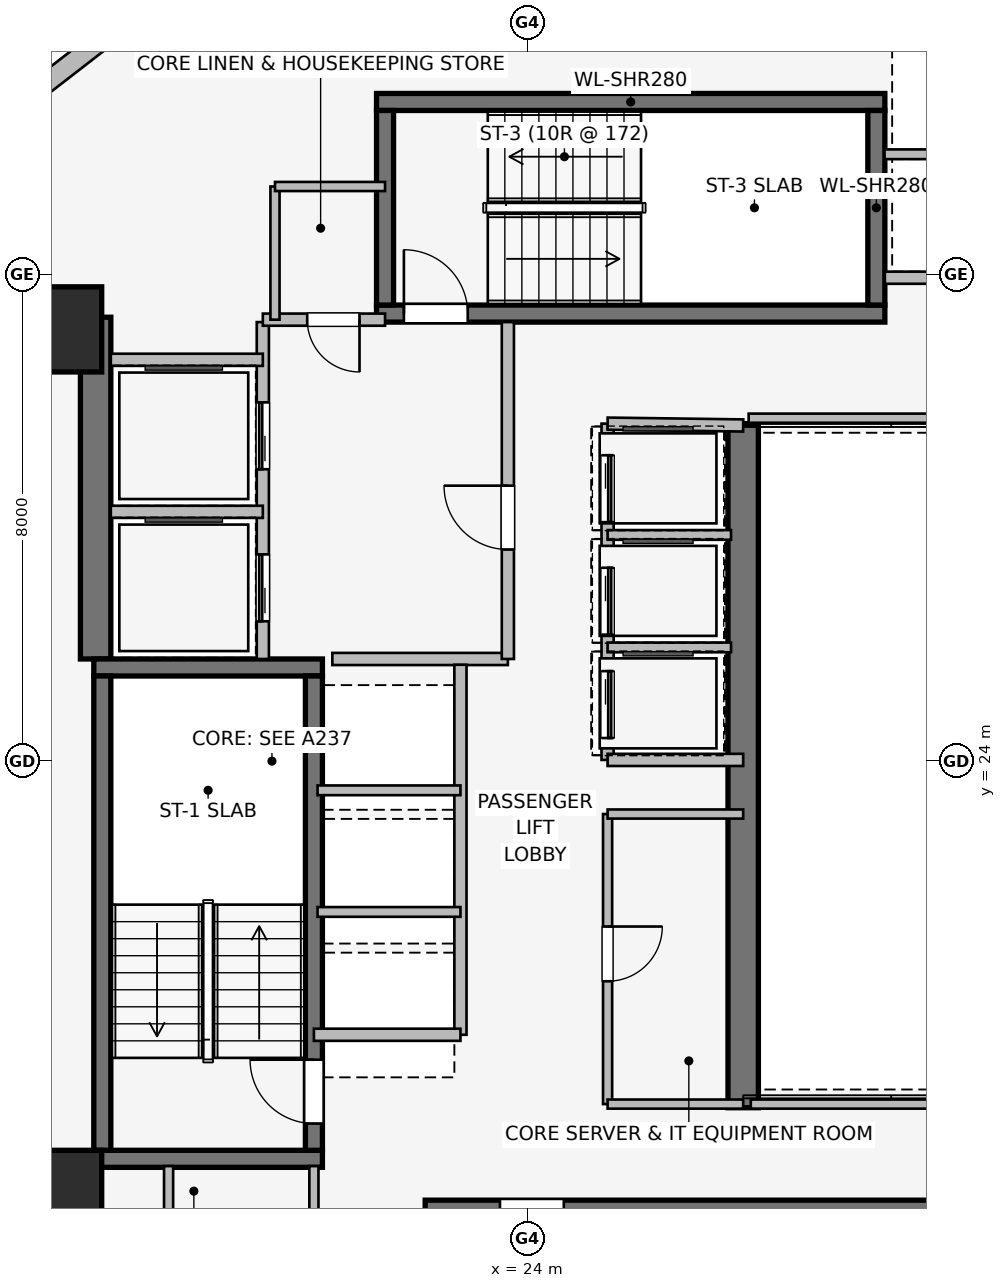
"""IFC4 building model, lengths in metres.
Left out: names, types, materials, properties, quantities, classifications, styles, units other than length and angle.
Written with IfcOpenShell. Run it as: python <this file> out.ifc"""

import sys

from ifc_helpers import new_model, si_unit, direction, frame, frame_2d, origin, origin_2d, place, context, subcontext, project, spatial, rectangle, extrude, element, fill, save


model = new_model("IFC4")
c1 = context("Model", 3, precision=1e-05, world=origin(), true_north=direction((0.0, 1.0)))
c2 = subcontext(c1, "Body", "Model", "MODEL_VIEW")
j1 = project(units=[si_unit("LENGTHUNIT", "METRE"), si_unit("PLANEANGLEUNIT", "RADIAN")], contexts=[c1])
p1 = place(None, origin())
s1 = spatial("IfcSite", under=j1, at=p1, CompositionType="ELEMENT")
p2 = place(p1, origin())
s2 = spatial("IfcBuilding", under=s1, at=p2, CompositionType="ELEMENT")
p3 = place(p2, frame((0.0, 0.0, 132.6)))
s3 = spatial("IfcBuildingStorey", under=s2, at=p3, CompositionType="ELEMENT", Elevation=132.6)
p4 = place(p3, frame((16.9, 25.68, 0.0), z_axis=(0.0, 0.0, 1.0), x_axis=(0.0, 1.0, 0.0)))
e1 = element("IfcWall", 1, at=p4, inside=s3, PredefinedType="SHEAR", context=c2, shape_type="SweptSolid", body=[
    extrude(rectangle(XDim=5.62, YDim=0.5, at=frame_2d((2.81, 0.0))), origin(), (0.0, 0.0, 1.0), 3.45),
])
p5 = place(p3, frame((27.55, 29.55, 0.0), z_axis=(0.0, 0.0, 1.0), x_axis=(0.0, -1.0, 0.0)))
e2 = element("IfcWall", 2, at=p5, inside=s3, PredefinedType="SHEAR", context=c2, shape_type="SweptSolid", body=[
    extrude(rectangle(XDim=11.25, YDim=0.5, at=frame_2d((5.625, 0.0))), origin(), (0.0, 0.0, 1.0), 3.45),
])
for number, where, z_axis, x_axis in (
    (3, (16.87, 17.46, 0.0), (0.0, 0.0, 1.0), (1.0, 0.0, 0.0)),
    (4, (20.63, 25.54, 0.0), (0.0, 0.0, 1.0), (-1.0, 0.0, 0.0)),
):
    element("IfcWall", number, at=place(p3, frame(where, z_axis=z_axis, x_axis=x_axis)), inside=s3, PredefinedType="SHEAR", context=c2, shape_type="SweptSolid", body=[
        extrude(rectangle(XDim=3.76, YDim=0.28, at=frame_2d((1.88, 0.0))), origin(), (0.0, 0.0, 1.0), 3.45),
    ])
p6 = place(p3, frame((17.01, 25.4, 0.0), z_axis=(0.0, 0.0, 1.0), x_axis=(0.0, -1.0, 0.0)))
e5 = element("IfcWall", 5, at=p6, inside=s3, PredefinedType="SHEAR", context=c2, shape_type="SweptSolid", body=[
    extrude(rectangle(XDim=7.8, YDim=0.28, at=frame_2d((3.9, 0.0))), origin(), (0.0, 0.0, 1.0), 3.45),
])
p7 = place(p3, frame((20.49, 17.6, 0.0), z_axis=(0.0, 0.0, 1.0), x_axis=(0.0, 1.0, 0.0)))
e6 = element("IfcWall", 6, at=p7, inside=s3, PredefinedType="SHEAR", context=c2, shape_type="SweptSolid", body=[
    extrude(rectangle(XDim=7.8, YDim=0.28, at=frame_2d((3.9, 0.0))), origin(), (0.0, 0.0, 1.0), 3.45),
])
p8 = place(p7, frame((0.44, 0.0, 0.0)))
e7 = element("IfcOpeningElement", 7, at=p8, cuts=e6, PredefinedType="OPENING", context=c2, shape_type="SweptSolid", body=[
    extrude(rectangle(XDim=1.05, YDim=2.0, at=frame_2d((0.525, 1.0))), frame((0.0, 0.15, 0.0), z_axis=(0.0, -1.0, 0.0), x_axis=(1.0, 0.0, 0.0)), (0.0, 0.0, 1.0), 0.3),
])
p9 = place(p3, frame((30.68, 16.64, 0.0), z_axis=(0.0, 0.0, 1.0), x_axis=(-1.0, 0.0, 0.0)))
e8 = element("IfcWall", 8, at=p9, inside=s3, PredefinedType="SHEAR", context=c2, shape_type="SweptSolid", body=[
    extrude(rectangle(XDim=8.36, YDim=0.28, at=frame_2d((4.18, 0.0))), origin(), (0.0, 0.0, 1.0), 3.45),
])
p10 = place(p9, frame((6.08, 0.0, 0.0)))
e9 = element("IfcOpeningElement", 9, at=p10, cuts=e8, PredefinedType="OPENING", context=c2, shape_type="SweptSolid", body=[
    extrude(rectangle(XDim=1.05, YDim=2.0, at=frame_2d((0.525, 1.0))), frame((0.0, 0.15, 0.0), z_axis=(0.0, -1.0, 0.0), x_axis=(1.0, 0.0, 0.0)), (0.0, 0.0, 1.0), 0.3),
])
p11 = place(p3, frame((21.52, 31.36, 0.0), z_axis=(0.0, 0.0, 1.0), x_axis=(1.0, 0.0, 0.0)))
e10 = element("IfcWall", 10, at=p11, inside=s3, PredefinedType="SHEAR", context=c2, shape_type="SweptSolid", body=[
    extrude(rectangle(XDim=8.36, YDim=0.28, at=frame_2d((4.18, 0.0))), origin(), (0.0, 0.0, 1.0), 3.45),
])
p12 = place(p11, frame((0.45, 0.0, 0.0)))
e11 = element("IfcOpeningElement", 11, at=p12, cuts=e10, PredefinedType="OPENING", context=c2, shape_type="SweptSolid", body=[
    extrude(rectangle(XDim=1.05, YDim=2.0, at=frame_2d((0.525, 1.0))), frame((0.0, 0.15, 0.0), z_axis=(0.0, -1.0, 0.0), x_axis=(1.0, 0.0, 0.0)), (0.0, 0.0, 1.0), 0.3),
])
p13 = place(p3, frame((29.88, 34.84, 0.0), z_axis=(0.0, 0.0, 1.0), x_axis=(-1.0, 0.0, 0.0)))
e12 = element("IfcWall", 12, at=p13, inside=s3, PredefinedType="SHEAR", context=c2, shape_type="SweptSolid", body=[
    extrude(rectangle(XDim=8.36, YDim=0.28, at=frame_2d((4.18, 0.0))), origin(), (0.0, 0.0, 1.0), 3.45),
])
for number, where, z_axis, x_axis in (
    (13, (21.66, 34.7, 0.0), (0.0, 0.0, 1.0), (0.0, -1.0, 0.0)),
    (14, (29.74, 31.5, 0.0), (0.0, 0.0, 1.0), (0.0, 1.0, 0.0)),
):
    element("IfcWall", number, at=place(p3, frame(where, z_axis=z_axis, x_axis=x_axis)), inside=s3, PredefinedType="SHEAR", context=c2, shape_type="SweptSolid", body=[
        extrude(rectangle(XDim=3.2, YDim=0.28, at=frame_2d((1.6, 0.0))), origin(), (0.0, 0.0, 1.0), 3.45),
    ])
for number, where, z_axis, x_axis in (
    (15, (16.3, 16.9, 0.0), (0.0, 0.0, 1.0), (1.0, 0.0, 0.0)),
    (16, (16.3, 31.1, 0.0), (0.0, 0.0, 1.0), (1.0, 0.0, 0.0)),
):
    element("IfcColumn", number, at=place(p3, frame(where, z_axis=z_axis, x_axis=x_axis)), inside=s3, PredefinedType="COLUMN", context=c2, shape_type="SweptSolid", body=[
        extrude(rectangle(XDim=1.4, YDim=1.4, at=origin_2d()), origin(), (0.0, 0.0, 1.0), 3.45),
    ])
p14 = place(p3, frame((15.918, 35.024, 0.0), z_axis=(0.0, 0.0, 1.0), x_axis=(0.790621329885, 0.612305408053, 0.0)))
e17 = element("IfcWall", 17, at=p14, inside=s3, PredefinedType="STANDARD", context=c2, shape_type="SweptSolid", body=[
    extrude(rectangle(XDim=1.676, YDim=0.33, at=frame_2d((0.838, 0.0))), origin(), (0.0, 0.0, 1.0), 3.19),
])
p15 = place(p3, frame((19.65, 25.68, 0.0), z_axis=(0.0, 0.0, 1.0), x_axis=(0.0, 1.0, 0.0)))
e18 = element("IfcWall", 18, at=p15, inside=s3, PredefinedType="PARTITIONING", context=c2, shape_type="SweptSolid", body=[
    extrude(rectangle(XDim=5.54, YDim=0.2, at=frame_2d((2.77, 0.0))), origin(), (0.0, 0.0, 1.0), 3.19),
])
p16 = place(p15, frame((0.62, 0.0, 0.0)))
e19 = element("IfcOpeningElement", 19, at=p16, cuts=e18, PredefinedType="OPENING", context=c2, shape_type="SweptSolid", body=[
    extrude(rectangle(XDim=1.1, YDim=2.2, at=frame_2d((0.55, 1.1))), frame((0.0, 0.11, 0.0), z_axis=(0.0, -1.0, 0.0), x_axis=(1.0, 0.0, 0.0)), (0.0, 0.0, 1.0), 0.22),
])
p17 = place(p15, frame((3.12, 0.0, 0.0)))
e20 = element("IfcOpeningElement", 20, at=p17, cuts=e18, PredefinedType="OPENING", context=c2, shape_type="SweptSolid", body=[
    extrude(rectangle(XDim=1.1, YDim=2.2, at=frame_2d((0.55, 1.1))), frame((0.0, 0.11, 0.0), z_axis=(0.0, -1.0, 0.0), x_axis=(1.0, 0.0, 0.0)), (0.0, 0.0, 1.0), 0.22),
])
p18 = place(p3, frame((20.793, 25.68, 0.0), z_axis=(0.0, 0.0, 1.0), x_axis=(1.0, 0.0, 0.0)))
e21 = element("IfcWall", 21, at=p18, inside=s3, PredefinedType="PARTITIONING", context=c2, shape_type="SweptSolid", body=[
    extrude(rectangle(XDim=2.887, YDim=0.2, at=frame_2d((1.443, 0.0))), origin(), (0.0, 0.0, 1.0), 3.19),
])
p19 = place(p3, frame((23.68, 25.68, 0.0), z_axis=(0.0, 0.0, 1.0), x_axis=(0.0, 1.0, 0.0)))
e22 = element("IfcWall", 22, at=p19, inside=s3, PredefinedType="PARTITIONING", context=c2, shape_type="SweptSolid", body=[
    extrude(rectangle(XDim=5.54, YDim=0.2, at=frame_2d((2.77, 0.0))), origin(), (0.0, 0.0, 1.0), 3.19),
])
p20 = place(p19, frame((1.8, 0.0, 0.0)))
e23 = element("IfcOpeningElement", 23, at=p20, cuts=e22, PredefinedType="OPENING", context=c2, shape_type="SweptSolid", body=[
    extrude(rectangle(XDim=1.05, YDim=2.0, at=frame_2d((0.525, 1.0))), frame((0.0, 0.11, 0.0), z_axis=(0.0, -1.0, 0.0), x_axis=(1.0, 0.0, 0.0)), (0.0, 0.0, 1.0), 0.22),
])
p21 = place(p3, frame((21.66, 31.26, 0.0), z_axis=(0.0, 0.0, 1.0), x_axis=(-1.0, 0.0, 0.0)))
e24 = element("IfcWall", 24, at=p21, inside=s3, PredefinedType="PARTITIONING", context=c2, shape_type="SweptSolid", body=[
    extrude(rectangle(XDim=2.01, YDim=0.2, at=frame_2d((1.005, 0.0))), origin(), (0.0, 0.0, 1.0), 3.19),
])
p22 = place(p21, frame((0.42, 0.0, 0.0)))
e25 = element("IfcOpeningElement", 25, at=p22, cuts=e24, PredefinedType="OPENING", context=c2, shape_type="SweptSolid", body=[
    extrude(rectangle(XDim=0.86, YDim=2.0, at=frame_2d((0.43, 1.0))), frame((0.0, 0.11, 0.0), z_axis=(0.0, -1.0, 0.0), x_axis=(1.0, 0.0, 0.0)), (0.0, 0.0, 1.0), 0.22),
])
p23 = place(p3, frame((17.15, 28.1, 0.0), z_axis=(0.0, 0.0, 1.0), x_axis=(1.0, 0.0, 0.0)))
e26 = element("IfcWall", 26, at=p23, inside=s3, PredefinedType="PARTITIONING", context=c2, shape_type="SweptSolid", body=[
    extrude(rectangle(XDim=2.5, YDim=0.2, at=frame_2d((1.25, 0.0))), origin(), (0.0, 0.0, 1.0), 3.19),
])
p24 = place(p3, frame((19.65, 30.6, 0.0), z_axis=(0.0, 0.0, 1.0), x_axis=(-1.0, 0.0, 0.0)))
e27 = element("IfcWall", 27, at=p24, inside=s3, PredefinedType="PARTITIONING", context=c2, shape_type="SweptSolid", body=[
    extrude(rectangle(XDim=2.5, YDim=0.2, at=frame_2d((1.25, 0.0))), origin(), (0.0, 0.0, 1.0), 2.09),
])
p25 = place(p3, frame((32.48, 31.95, 0.0), z_axis=(0.0, 0.0, 1.0), x_axis=(-1.0, 0.0, 0.0)))
e28 = element("IfcWall", 28, at=p25, inside=s3, PredefinedType="PARTITIONING", context=c2, shape_type="SweptSolid", body=[
    extrude(rectangle(XDim=2.6, YDim=0.2, at=frame_2d((1.3, 0.0))), origin(), (0.0, 0.0, 1.0), 3.19),
])
p26 = place(p3, frame((29.875, 33.98, 0.0), z_axis=(0.0, 0.0, 1.0), x_axis=(1.0, 0.0, 0.0)))
e29 = element("IfcWall", 29, at=p26, inside=s3, PredefinedType="PARTITIONING", context=c2, shape_type="SweptSolid", body=[
    extrude(rectangle(XDim=2.605, YDim=0.16, at=frame_2d((1.302, 0.0))), origin(), (0.0, 0.0, 1.0), 3.19),
])
p27 = place(p3, frame((22.9, 19.5, 0.0), z_axis=(0.0, 0.0, 1.0), x_axis=(0.0, 1.0, 0.0)))
e30 = element("IfcWall", 30, at=p27, inside=s3, PredefinedType="PARTITIONING", context=c2, shape_type="SweptSolid", body=[
    extrude(rectangle(XDim=6.085, YDim=0.2, at=frame_2d((3.042, 0.0))), origin(), (0.0, 0.0, 1.0), 3.19),
])
p28 = place(p3, frame((20.49, 19.5, 0.0), z_axis=(0.0, 0.0, 1.0), x_axis=(1.0, 0.0, 0.0)))
e31 = element("IfcWall", 31, at=p28, inside=s3, PredefinedType="PARTITIONING", context=c2, shape_type="SweptSolid", body=[
    extrude(rectangle(XDim=2.41, YDim=0.2, at=frame_2d((1.205, 0.0))), origin(), (0.0, 0.0, 1.0), 2.09),
])
for number, where, z_axis, x_axis in (
    (32, (20.55, 21.52, 0.0), (0.0, 0.0, 1.0), (1.0, 0.0, 0.0)),
    (33, (20.55, 23.52, 0.0), (0.0, 0.0, 1.0), (1.0, 0.0, 0.0)),
):
    element("IfcWall", number, at=place(p3, frame(where, z_axis=z_axis, x_axis=x_axis)), inside=s3, PredefinedType="PARTITIONING", context=c2, shape_type="SweptSolid", body=[
        extrude(rectangle(XDim=2.35, YDim=0.16, at=frame_2d((1.175, 0.0))), origin(), (0.0, 0.0, 1.0), 3.19),
    ])
p29 = place(p3, frame((25.32, 29.55, 0.0), z_axis=(0.0, 0.0, 1.0), x_axis=(0.0, -1.0, 0.0)))
e34 = element("IfcWall", 34, at=p29, inside=s3, PredefinedType="PARTITIONING", context=c2, shape_type="SweptSolid", body=[
    extrude(rectangle(XDim=5.53, YDim=0.2, at=frame_2d((2.765, 0.0))), origin(), (0.0, 0.0, 1.0), 3.19),
])
p30 = place(p29, frame((0.52, 0.0, 0.0)))
e35 = element("IfcOpeningElement", 35, at=p30, cuts=e34, PredefinedType="OPENING", context=c2, shape_type="SweptSolid", body=[
    extrude(rectangle(XDim=1.1, YDim=2.2, at=frame_2d((0.55, 1.1))), frame((0.0, 0.11, 0.0), z_axis=(0.0, -1.0, 0.0), x_axis=(1.0, 0.0, 0.0)), (0.0, 0.0, 1.0), 0.22),
])
p31 = place(p29, frame((2.37, 0.0, 0.0)))
e36 = element("IfcOpeningElement", 36, at=p31, cuts=e34, PredefinedType="OPENING", context=c2, shape_type="SweptSolid", body=[
    extrude(rectangle(XDim=1.1, YDim=2.2, at=frame_2d((0.55, 1.1))), frame((0.0, 0.11, 0.0), z_axis=(0.0, -1.0, 0.0), x_axis=(1.0, 0.0, 0.0)), (0.0, 0.0, 1.0), 0.22),
])
p32 = place(p29, frame((4.07, 0.0, 0.0)))
e37 = element("IfcOpeningElement", 37, at=p32, cuts=e34, PredefinedType="OPENING", context=c2, shape_type="SweptSolid", body=[
    extrude(rectangle(XDim=1.1, YDim=2.2, at=frame_2d((0.55, 1.1))), frame((0.0, 0.11, 0.0), z_axis=(0.0, -1.0, 0.0), x_axis=(1.0, 0.0, 0.0)), (0.0, 0.0, 1.0), 0.22),
])
p33 = place(p3, frame((27.55, 29.52, 0.0), z_axis=(0.0, 0.0, 1.0), x_axis=(-0.999909343457, 0.013464949556, 0.0)))
e38 = element("IfcWall", 38, at=p33, inside=s3, PredefinedType="PARTITIONING", context=c2, shape_type="SweptSolid", body=[
    extrude(rectangle(XDim=2.23, YDim=0.2, at=frame_2d((1.115, 0.0))), origin(), (0.0, 0.0, 1.0), 2.09),
])
p34 = place(p3, frame((25.32, 24.02, 0.0), z_axis=(0.0, 0.0, 1.0), x_axis=(1.0, 0.0, 0.0)))
e39 = element("IfcWall", 39, at=p34, inside=s3, PredefinedType="PARTITIONING", context=c2, shape_type="SweptSolid", body=[
    extrude(rectangle(XDim=2.23, YDim=0.2, at=frame_2d((1.115, 0.0))), origin(), (0.0, 0.0, 1.0), 3.19),
])
for number, where, z_axis, x_axis in (
    (40, (25.32, 25.87, 0.0), (0.0, 0.0, 1.0), (1.0, 0.0, 0.0)),
    (41, (25.32, 27.72, 0.0), (0.0, 0.0, 1.0), (1.0, 0.0, 0.0)),
):
    element("IfcWall", number, at=place(p3, frame(where, z_axis=z_axis, x_axis=x_axis)), inside=s3, PredefinedType="PARTITIONING", context=c2, shape_type="SweptSolid", body=[
        extrude(rectangle(XDim=2.03, YDim=0.16, at=frame_2d((1.015, 0.0))), origin(), (0.0, 0.0, 1.0), 3.19),
    ])
p35 = place(p3, frame((25.32, 23.13, 0.0), z_axis=(0.0, 0.0, 1.0), x_axis=(0.0, -1.0, 0.0)))
e42 = element("IfcWall", 42, at=p35, inside=s3, PredefinedType="PARTITIONING", context=c2, shape_type="SweptSolid", body=[
    extrude(rectangle(XDim=4.77, YDim=0.15, at=frame_2d((2.385, 0.0))), origin(), (0.0, 0.0, 1.0), 3.19),
])
p36 = place(p35, frame((1.85, 0.0, 0.0)))
e43 = element("IfcOpeningElement", 43, at=p36, cuts=e42, PredefinedType="OPENING", context=c2, shape_type="SweptSolid", body=[
    extrude(rectangle(XDim=0.9, YDim=2.0, at=frame_2d((0.45, 1.0))), frame((0.0, 0.085, 0.0), z_axis=(0.0, -1.0, 0.0), x_axis=(1.0, 0.0, 0.0)), (0.0, 0.0, 1.0), 0.17),
])
for number, where, z_axis, x_axis in (
    (44, (25.32, 23.13, 0.0), (0.0, 0.0, 1.0), (1.0, 0.0, 0.0)),
    (45, (25.32, 18.36, 0.0), (0.0, 0.0, 1.0), (1.0, 0.0, 0.0)),
):
    element("IfcWall", number, at=place(p3, frame(where, z_axis=z_axis, x_axis=x_axis)), inside=s3, PredefinedType="PARTITIONING", context=c2, shape_type="SweptSolid", body=[
        extrude(rectangle(XDim=2.23, YDim=0.15, at=frame_2d((1.115, 0.0))), origin(), (0.0, 0.0, 1.0), 3.19),
    ])
p37 = place(p3, frame((18.1, 17.34, 0.0), z_axis=(0.0, 0.0, 1.0), x_axis=(0.0, -1.0, 0.0)))
e46 = element("IfcWall", 46, at=p37, inside=s3, PredefinedType="PARTITIONING", context=c2, shape_type="SweptSolid", body=[
    extrude(rectangle(XDim=2.52, YDim=0.15, at=frame_2d((1.26, 0.0))), origin(), (0.0, 0.0, 1.0), 3.19),
])
p38 = place(p3, frame((20.49, 14.82, 0.0), z_axis=(0.0, 0.0, 1.0), x_axis=(0.0, 1.0, 0.0)))
e47 = element("IfcWall", 47, at=p38, inside=s3, PredefinedType="PARTITIONING", context=c2, shape_type="SweptSolid", body=[
    extrude(rectangle(XDim=2.52, YDim=0.15, at=frame_2d((1.26, 0.0))), origin(), (0.0, 0.0, 1.0), 3.19),
])
p39 = place(p38, frame((0.72, 0.0, 0.0)))
e48 = element("IfcOpeningElement", 48, at=p39, cuts=e47, PredefinedType="OPENING", context=c2, shape_type="SweptSolid", body=[
    extrude(rectangle(XDim=0.86, YDim=2.0, at=frame_2d((0.43, 1.0))), frame((0.0, 0.085, 0.0), z_axis=(0.0, -1.0, 0.0), x_axis=(1.0, 0.0, 0.0)), (0.0, 0.0, 1.0), 0.17),
])
p40 = place(p3, frame((19.85, 33.45, 0.0), z_axis=(0.0, 0.0, 1.0), x_axis=(0.0, -1.0, 0.0)))
e49 = element("IfcWall", 49, at=p40, inside=s3, PredefinedType="PARTITIONING", context=c2, shape_type="SweptSolid", body=[
    extrude(rectangle(XDim=2.19, YDim=0.15, at=frame_2d((1.095, 0.0))), origin(), (0.0, 0.0, 1.0), 3.19),
])
p41 = place(p3, frame((21.66, 33.45, 0.0), z_axis=(0.0, 0.0, 1.0), x_axis=(-1.0, 0.0, 0.0)))
e50 = element("IfcWall", 50, at=p41, inside=s3, PredefinedType="PARTITIONING", context=c2, shape_type="SweptSolid", body=[
    extrude(rectangle(XDim=1.81, YDim=0.15, at=frame_2d((0.905, 0.0))), origin(), (0.0, 0.0, 1.0), 3.19),
])
p42 = place(p3, frame((27.675, 18.36, 0.0), z_axis=(0.0, 0.0, 1.0), x_axis=(1.0, 0.0, 0.0)))
e51 = element("IfcWall", 51, at=p42, inside=s3, PredefinedType="PARTITIONING", context=c2, shape_type="SweptSolid", body=[
    extrude(rectangle(XDim=12.165, YDim=0.15, at=frame_2d((6.083, 0.0))), origin(), (0.0, 0.0, 1.0), 2.331),
])
p43 = place(p3, frame((39.84, 29.64, 0.0), z_axis=(0.0, 0.0, 1.0), x_axis=(-1.0, 0.0, 0.0)))
e52 = element("IfcWall", 52, at=p43, inside=s3, PredefinedType="PARTITIONING", context=c2, shape_type="SweptSolid", body=[
    extrude(rectangle(XDim=12.2, YDim=0.15, at=frame_2d((6.1, 0.0))), origin(), (0.0, 0.0, 1.0), 2.331),
])
p44 = place(p8, origin())
e53 = element("IfcDoor", 53, at=p44, inside=s3, OperationType="SINGLE_SWING_RIGHT", PredefinedType="DOOR", context=c2, shape_type="SweptSolid", body=[
    extrude(rectangle(XDim=1.05, YDim=2.0, at=frame_2d((0.525, 1.0))), frame((0.0, 0.025, 0.0), z_axis=(0.0, -1.0, 0.0), x_axis=(1.0, 0.0, 0.0)), (0.0, 0.0, 1.0), 0.05),
])
fill(e7, e53)
p45 = place(p10, origin())
e54 = element("IfcDoor", 54, at=p45, inside=s3, OperationType="SINGLE_SWING_RIGHT", PredefinedType="DOOR", context=c2, shape_type="SweptSolid", body=[
    extrude(rectangle(XDim=1.05, YDim=2.0, at=frame_2d((0.525, 1.0))), frame((0.0, 0.025, 0.0), z_axis=(0.0, -1.0, 0.0), x_axis=(1.0, 0.0, 0.0)), (0.0, 0.0, 1.0), 0.05),
])
fill(e9, e54)
p46 = place(p12, origin())
e55 = element("IfcDoor", 55, at=p46, inside=s3, OperationType="SINGLE_SWING_LEFT", PredefinedType="DOOR", context=c2, shape_type="SweptSolid", body=[
    extrude(rectangle(XDim=1.05, YDim=2.0, at=frame_2d((0.525, 1.0))), frame((0.0, 0.025, 0.0), z_axis=(0.0, -1.0, 0.0), x_axis=(1.0, 0.0, 0.0)), (0.0, 0.0, 1.0), 0.05),
])
fill(e11, e55)
p47 = place(p16, origin())
e56 = element("IfcDoor", 56, at=p47, inside=s3, OperationType="SLIDING_TO_LEFT", PredefinedType="DOOR", context=c2, shape_type="SweptSolid", body=[
    extrude(rectangle(XDim=1.1, YDim=2.2, at=frame_2d((0.55, 1.1))), frame((0.0, 0.025, 0.0), z_axis=(0.0, -1.0, 0.0), x_axis=(1.0, 0.0, 0.0)), (0.0, 0.0, 1.0), 0.05),
])
fill(e19, e56)
p48 = place(p17, origin())
e57 = element("IfcDoor", 57, at=p48, inside=s3, OperationType="SLIDING_TO_LEFT", PredefinedType="DOOR", context=c2, shape_type="SweptSolid", body=[
    extrude(rectangle(XDim=1.1, YDim=2.2, at=frame_2d((0.55, 1.1))), frame((0.0, 0.025, 0.0), z_axis=(0.0, -1.0, 0.0), x_axis=(1.0, 0.0, 0.0)), (0.0, 0.0, 1.0), 0.05),
])
fill(e20, e57)
p49 = place(p20, origin())
e58 = element("IfcDoor", 58, at=p49, inside=s3, OperationType="SINGLE_SWING_RIGHT", PredefinedType="DOOR", context=c2, shape_type="SweptSolid", body=[
    extrude(rectangle(XDim=1.05, YDim=2.0, at=frame_2d((0.525, 1.0))), frame((0.0, 0.025, 0.0), z_axis=(0.0, -1.0, 0.0), x_axis=(1.0, 0.0, 0.0)), (0.0, 0.0, 1.0), 0.05),
])
fill(e23, e58)
p50 = place(p22, origin())
e59 = element("IfcDoor", 59, at=p50, inside=s3, OperationType="SINGLE_SWING_LEFT", PredefinedType="DOOR", context=c2, shape_type="SweptSolid", body=[
    extrude(rectangle(XDim=0.86, YDim=2.0, at=frame_2d((0.43, 1.0))), frame((0.0, 0.025, 0.0), z_axis=(0.0, -1.0, 0.0), x_axis=(1.0, 0.0, 0.0)), (0.0, 0.0, 1.0), 0.05),
])
fill(e25, e59)
p51 = place(p30, origin())
e60 = element("IfcDoor", 60, at=p51, inside=s3, OperationType="SLIDING_TO_LEFT", PredefinedType="DOOR", context=c2, shape_type="SweptSolid", body=[
    extrude(rectangle(XDim=1.1, YDim=2.2, at=frame_2d((0.55, 1.1))), frame((0.0, 0.025, 0.0), z_axis=(0.0, -1.0, 0.0), x_axis=(1.0, 0.0, 0.0)), (0.0, 0.0, 1.0), 0.05),
])
fill(e35, e60)
p52 = place(p31, origin())
e61 = element("IfcDoor", 61, at=p52, inside=s3, OperationType="SLIDING_TO_LEFT", PredefinedType="DOOR", context=c2, shape_type="SweptSolid", body=[
    extrude(rectangle(XDim=1.1, YDim=2.2, at=frame_2d((0.55, 1.1))), frame((0.0, 0.025, 0.0), z_axis=(0.0, -1.0, 0.0), x_axis=(1.0, 0.0, 0.0)), (0.0, 0.0, 1.0), 0.05),
])
fill(e36, e61)
p53 = place(p32, origin())
e62 = element("IfcDoor", 62, at=p53, inside=s3, OperationType="SLIDING_TO_LEFT", PredefinedType="DOOR", context=c2, shape_type="SweptSolid", body=[
    extrude(rectangle(XDim=1.1, YDim=2.2, at=frame_2d((0.55, 1.1))), frame((0.0, 0.025, 0.0), z_axis=(0.0, -1.0, 0.0), x_axis=(1.0, 0.0, 0.0)), (0.0, 0.0, 1.0), 0.05),
])
fill(e37, e62)
p54 = place(p36, origin())
e63 = element("IfcDoor", 63, at=p54, inside=s3, OperationType="SINGLE_SWING_LEFT", PredefinedType="DOOR", context=c2, shape_type="SweptSolid", body=[
    extrude(rectangle(XDim=0.9, YDim=2.0, at=frame_2d((0.45, 1.0))), frame((0.0, 0.025, 0.0), z_axis=(0.0, -1.0, 0.0), x_axis=(1.0, 0.0, 0.0)), (0.0, 0.0, 1.0), 0.05),
])
fill(e43, e63)
save(model, sys.argv[1])
